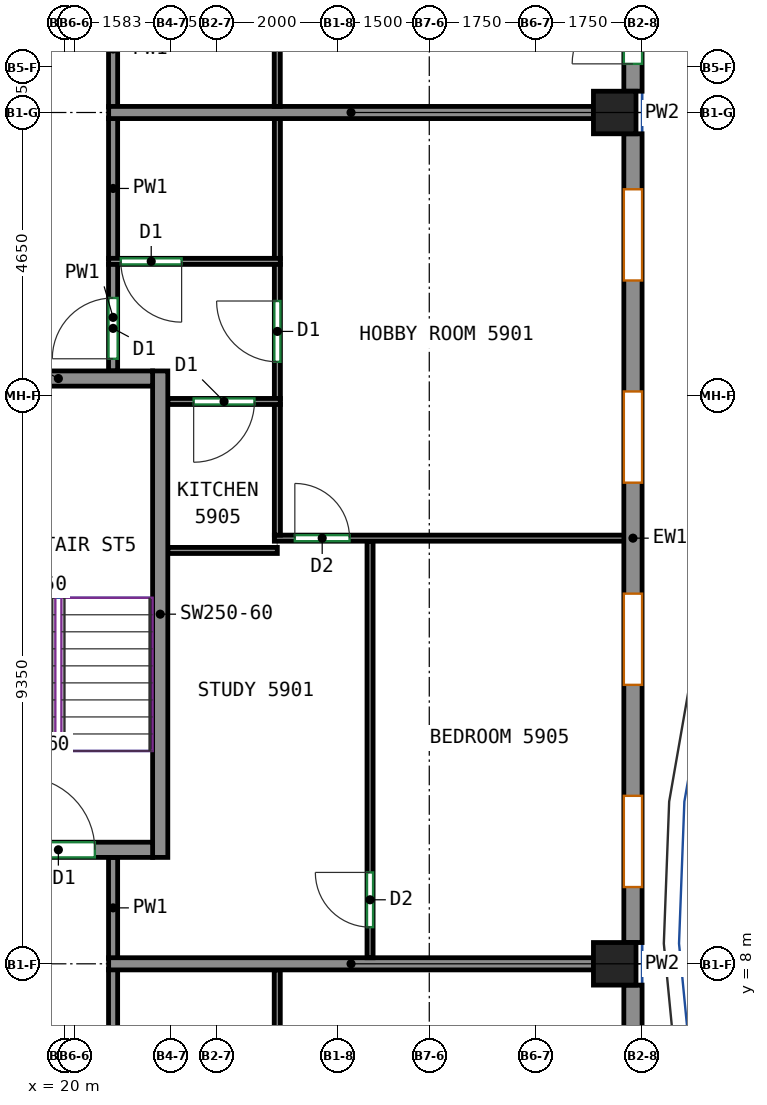
"""IFC4 building model, lengths in metres.
Left out: names, types, materials, properties, quantities, classifications, styles, units other than length and angle.
Written with IfcOpenShell. Run it as: python <this file> out.ifc"""

import sys

from ifc_helpers import new_model, si_unit, direction, frame, frame_2d, origin, origin_2d, place, context, subcontext, project, spatial, rectangle, extrude, source, transform, mapped, element, fill, save


model = new_model("IFC4")
c1 = context("Model", 3, precision=1e-05, world=origin(), true_north=direction((0.0, 1.0)))
c2 = subcontext(c1, "Body", "Model", "MODEL_VIEW")
j1 = project(units=[si_unit("LENGTHUNIT", "METRE"), si_unit("PLANEANGLEUNIT", "RADIAN")], contexts=[c1])
p1 = place(None, origin())
s1 = spatial("IfcSite", under=j1, at=p1, CompositionType="ELEMENT")
p2 = place(p1, origin())
s2 = spatial("IfcBuilding", under=s1, at=p2, CompositionType="ELEMENT")
p3 = place(p2, frame((0.0, 0.0, 245.8)))
s3 = spatial("IfcBuildingStorey", under=s2, at=p3, CompositionType="ELEMENT", Elevation=245.8)
m1 = source(origin(), c2, "Body", "SweptSolid", [
    extrude(rectangle(XDim=0.7, YDim=0.7, at=origin_2d()), origin(), (0.0, 0.0, 1.0), 3.12),
])
for number, where, z_axis, x_axis in (
    (1, (29.05, 8.0, 0.0), (0.0, 0.0, 1.0), (1.0, 0.0, 0.0)),
    (2, (29.05, 22.0, 0.0), (0.0, 0.0, 1.0), (1.0, 0.0, 0.0)),
):
    element("IfcColumn", number, at=place(p3, frame(where, z_axis=z_axis, x_axis=x_axis)), inside=s3, PredefinedType="COLUMN", context=c2, shape_type="MappedRepresentation", body=[
        mapped(m1, transform((0.0, 0.0, 0.0))),
    ])
m2 = source(origin(), c2, "Body", "SweptSolid", [
    extrude(rectangle(XDim=8.0, YDim=0.25, at=frame_2d((4.0, 0.0))), origin(), (0.0, 0.0, 1.0), 3.12),
])
p4 = place(p3, frame((21.575, 9.75, 0.0), z_axis=(0.0, 0.0, 1.0), x_axis=(0.0, 1.0, 0.0)))
e3 = element("IfcWall", 3, at=p4, inside=s3, PredefinedType="SHEAR", context=c2, shape_type="MappedRepresentation", body=[
    mapped(m2, transform((0.0, 0.0, 0.0))),
])
m3 = source(origin(), c2, "Body", "SweptSolid", [
    extrude(rectangle(XDim=3.1, YDim=0.25, at=frame_2d((1.55, 0.0))), origin(), (0.0, 0.0, 1.0), 3.12),
])
p5 = place(p3, frame((18.35, 9.875, 0.0), z_axis=(0.0, 0.0, 1.0), x_axis=(1.0, 0.0, 0.0)))
e4 = element("IfcWall", 4, at=p5, inside=s3, PredefinedType="SHEAR", context=c2, shape_type="MappedRepresentation", body=[
    mapped(m3, transform((0.0, 0.0, 0.0))),
])
p6 = place(p5, frame((0.95, 0.0, 0.0)))
e5 = element("IfcOpeningElement", 5, at=p6, cuts=e4, PredefinedType="OPENING", context=c2, shape_type="SweptSolid", body=[
    extrude(rectangle(XDim=1.2, YDim=2.1, at=frame_2d((0.6, 1.05))), frame((0.0, 0.135, 0.0), z_axis=(0.0, -1.0, 0.0), x_axis=(1.0, 0.0, 0.0)), (0.0, 0.0, 1.0), 0.27),
])
p7 = place(p3, frame((18.35, 17.625, 0.0), z_axis=(0.0, 0.0, 1.0), x_axis=(1.0, 0.0, 0.0)))
e6 = element("IfcWall", 6, at=p7, inside=s3, PredefinedType="SHEAR", context=c2, shape_type="MappedRepresentation", body=[
    mapped(m3, transform((0.0, 0.0, 0.0))),
])
m4 = source(origin(), c2, "Body", "SweptSolid", [
    extrude(rectangle(XDim=8.133, YDim=0.3, at=frame_2d((4.067, 0.0))), origin(), (0.0, 0.0, 1.0), 3.12),
])
p8 = place(p3, frame((29.35, -0.483, 0.0), z_axis=(0.0, 0.0, 1.0), x_axis=(0.0, 1.0, 0.0)))
e7 = element("IfcWall", 7, at=p8, inside=s3, PredefinedType="SOLIDWALL", context=c2, shape_type="MappedRepresentation", body=[
    mapped(m4, transform((0.0, 0.0, 0.0))),
])
p9 = place(p8, frame((1.75, 0.0, 0.8)))
e8 = element("IfcOpeningElement", 8, at=p9, cuts=e7, PredefinedType="OPENING", context=c2, shape_type="SweptSolid", body=[
    extrude(rectangle(XDim=1.5, YDim=2.05, at=frame_2d((0.75, 1.025))), frame((0.0, 0.16, 0.0), z_axis=(0.0, -1.0, 0.0), x_axis=(1.0, 0.0, 0.0)), (0.0, 0.0, 1.0), 0.32),
])
p10 = place(p8, frame((0.45, 0.0, 0.0)))
e9 = element("IfcOpeningElement", 9, at=p10, cuts=e7, PredefinedType="OPENING", context=c2, shape_type="SweptSolid", body=[
    extrude(rectangle(XDim=1.0, YDim=2.1, at=frame_2d((0.5, 1.05))), frame((0.0, 0.16, 0.0), z_axis=(0.0, -1.0, 0.0), x_axis=(1.0, 0.0, 0.0)), (0.0, 0.0, 1.0), 0.32),
])
p11 = place(p8, frame((5.817, 0.0, 0.8)))
e10 = element("IfcOpeningElement", 10, at=p11, cuts=e7, PredefinedType="OPENING", context=c2, shape_type="SweptSolid", body=[
    extrude(rectangle(XDim=1.5, YDim=2.05, at=frame_2d((0.75, 1.025))), frame((0.0, 0.16, 0.0), z_axis=(0.0, -1.0, 0.0), x_axis=(1.0, 0.0, 0.0)), (0.0, 0.0, 1.0), 0.32),
])
m5 = source(origin(), c2, "Body", "SweptSolid", [
    extrude(rectangle(XDim=13.3, YDim=0.3, at=frame_2d((6.65, 0.0))), origin(), (0.0, 0.0, 1.0), 3.12),
])
p12 = place(p3, frame((29.35, 8.35, 0.0), z_axis=(0.0, 0.0, 1.0), x_axis=(0.0, 1.0, 0.0)))
e11 = element("IfcWall", 11, at=p12, inside=s3, PredefinedType="SOLIDWALL", context=c2, shape_type="MappedRepresentation", body=[
    mapped(m5, transform((0.0, 0.0, 0.0))),
])
p13 = place(p12, frame((0.913, 0.0, 0.8)))
e12 = element("IfcOpeningElement", 12, at=p13, cuts=e11, PredefinedType="OPENING", context=c2, shape_type="SweptSolid", body=[
    extrude(rectangle(XDim=1.5, YDim=2.05, at=frame_2d((0.75, 1.025))), frame((0.0, 0.16, 0.0), z_axis=(0.0, -1.0, 0.0), x_axis=(1.0, 0.0, 0.0)), (0.0, 0.0, 1.0), 0.32),
])
p14 = place(p12, frame((4.238, 0.0, 0.8)))
e13 = element("IfcOpeningElement", 13, at=p14, cuts=e11, PredefinedType="OPENING", context=c2, shape_type="SweptSolid", body=[
    extrude(rectangle(XDim=1.5, YDim=2.05, at=frame_2d((0.75, 1.025))), frame((0.0, 0.16, 0.0), z_axis=(0.0, -1.0, 0.0), x_axis=(1.0, 0.0, 0.0)), (0.0, 0.0, 1.0), 0.32),
])
p15 = place(p12, frame((7.562, 0.0, 0.8)))
e14 = element("IfcOpeningElement", 14, at=p15, cuts=e11, PredefinedType="OPENING", context=c2, shape_type="SweptSolid", body=[
    extrude(rectangle(XDim=1.5, YDim=2.05, at=frame_2d((0.75, 1.025))), frame((0.0, 0.16, 0.0), z_axis=(0.0, -1.0, 0.0), x_axis=(1.0, 0.0, 0.0)), (0.0, 0.0, 1.0), 0.32),
])
p16 = place(p12, frame((10.887, 0.0, 0.8)))
e15 = element("IfcOpeningElement", 15, at=p16, cuts=e11, PredefinedType="OPENING", context=c2, shape_type="SweptSolid", body=[
    extrude(rectangle(XDim=1.5, YDim=2.05, at=frame_2d((0.75, 1.025))), frame((0.0, 0.16, 0.0), z_axis=(0.0, -1.0, 0.0), x_axis=(1.0, 0.0, 0.0)), (0.0, 0.0, 1.0), 0.32),
])
m6 = source(origin(), c2, "Body", "SweptSolid", [
    extrude(rectangle(XDim=4.3, YDim=0.3, at=frame_2d((2.15, 0.0))), origin(), (0.0, 0.0, 1.0), 3.12),
])
p17 = place(p3, frame((29.35, 22.35, 0.0), z_axis=(0.0, 0.0, 1.0), x_axis=(0.0, 1.0, 0.0)))
e16 = element("IfcWall", 16, at=p17, inside=s3, PredefinedType="SOLIDWALL", context=c2, shape_type="MappedRepresentation", body=[
    mapped(m6, transform((0.0, 0.0, 0.0))),
])
p18 = place(p17, frame((1.75, 0.0, 0.8)))
e17 = element("IfcOpeningElement", 17, at=p18, cuts=e16, PredefinedType="OPENING", context=c2, shape_type="SweptSolid", body=[
    extrude(rectangle(XDim=1.5, YDim=2.05, at=frame_2d((0.75, 1.025))), frame((0.0, 0.16, 0.0), z_axis=(0.0, -1.0, 0.0), x_axis=(1.0, 0.0, 0.0)), (0.0, 0.0, 1.0), 0.32),
])
p19 = place(p17, frame((0.45, 0.0, 0.0)))
e18 = element("IfcOpeningElement", 18, at=p19, cuts=e16, PredefinedType="OPENING", context=c2, shape_type="SweptSolid", body=[
    extrude(rectangle(XDim=1.0, YDim=2.1, at=frame_2d((0.5, 1.05))), frame((0.0, 0.16, 0.0), z_axis=(0.0, -1.0, 0.0), x_axis=(1.0, 0.0, 0.0)), (0.0, 0.0, 1.0), 0.32),
])
p20 = place(p3, frame((20.8, 3.623, 0.0), z_axis=(0.0, 0.0, 1.0), x_axis=(0.0, 1.0, 0.0)))
e19 = element("IfcWall", 19, at=p20, inside=s3, PredefinedType="PARTITIONING", context=c2, shape_type="SweptSolid", body=[
    extrude(rectangle(XDim=4.287, YDim=0.15, at=frame_2d((2.144, 0.0))), origin(), (0.0, 0.0, 1.0), 3.12),
])
p21 = place(p3, frame((20.8, 8.09, 0.0), z_axis=(0.0, 0.0, 1.0), x_axis=(0.0, 1.0, 0.0)))
e20 = element("IfcWall", 20, at=p21, inside=s3, PredefinedType="PARTITIONING", context=c2, shape_type="SweptSolid", body=[
    extrude(rectangle(XDim=1.66, YDim=0.15, at=frame_2d((0.83, 0.0))), origin(), (0.0, 0.0, 1.0), 3.12),
])
p22 = place(p3, frame((20.8, 17.75, 0.0), z_axis=(0.0, 0.0, 1.0), x_axis=(0.0, 1.0, 0.0)))
e21 = element("IfcWall", 21, at=p22, inside=s3, PredefinedType="PARTITIONING", context=c2, shape_type="SweptSolid", body=[
    extrude(rectangle(XDim=1.762, YDim=0.15, at=frame_2d((0.881, 0.0))), origin(), (0.0, 0.0, 1.0), 3.12),
])
p23 = place(p22, frame((0.2, 0.0, 0.0)))
e22 = element("IfcOpeningElement", 22, at=p23, cuts=e21, PredefinedType="OPENING", context=c2, shape_type="SweptSolid", body=[
    extrude(rectangle(XDim=1.0, YDim=2.1, at=frame_2d((0.5, 1.05))), frame((0.0, 0.085, 0.0), z_axis=(0.0, -1.0, 0.0), x_axis=(1.0, 0.0, 0.0)), (0.0, 0.0, 1.0), 0.17),
])
p24 = place(p3, frame((20.8, 19.592, 0.0), z_axis=(0.0, 0.0, 1.0), x_axis=(0.0, 1.0, 0.0)))
e23 = element("IfcWall", 23, at=p24, inside=s3, PredefinedType="PARTITIONING", context=c2, shape_type="SweptSolid", body=[
    extrude(rectangle(XDim=2.318, YDim=0.15, at=frame_2d((1.159, 0.0))), origin(), (0.0, 0.0, 1.0), 3.12),
])
p25 = place(p3, frame((20.8, 22.09, 0.0), z_axis=(0.0, 0.0, 1.0), x_axis=(0.0, 1.0, 0.0)))
e24 = element("IfcWall", 24, at=p25, inside=s3, PredefinedType="PARTITIONING", context=c2, shape_type="SweptSolid", body=[
    extrude(rectangle(XDim=1.908, YDim=0.15, at=frame_2d((0.954, 0.0))), origin(), (0.0, 0.0, 1.0), 3.12),
])
p26 = place(p3, frame((23.5, 3.633, 0.0), z_axis=(0.0, 0.0, 1.0), x_axis=(0.0, 1.0, 0.0)))
e25 = element("IfcWall", 25, at=p26, inside=s3, PredefinedType="PARTITIONING", context=c2, shape_type="SweptSolid", body=[
    extrude(rectangle(XDim=4.267, YDim=0.1, at=frame_2d((2.133, 0.0))), origin(), (0.0, 0.0, 1.0), 3.12),
])
p27 = place(p3, frame((20.727, 8.0, 0.0), z_axis=(0.0, 0.0, 1.0), x_axis=(1.0, 0.0, 0.0)))
e26 = element("IfcWall", 26, at=p27, inside=s3, PredefinedType="PARTITIONING", context=c2, shape_type="SweptSolid", body=[
    extrude(rectangle(XDim=7.973, YDim=0.2, at=frame_2d((3.986, 0.0))), origin(), (0.0, 0.0, 1.0), 2.57),
])
p28 = place(p3, frame((25.026, 8.1, 0.0), z_axis=(0.0, 0.0, 1.0), x_axis=(0.0, 1.0, 0.0)))
e27 = element("IfcWall", 27, at=p28, inside=s3, PredefinedType="PARTITIONING", context=c2, shape_type="SweptSolid", body=[
    extrude(rectangle(XDim=6.85, YDim=0.1, at=frame_2d((3.425, 0.0))), origin(), (0.0, 0.0, 1.0), 3.12),
])
p29 = place(p28, frame((0.503, 0.0, 0.0)))
e28 = element("IfcOpeningElement", 28, at=p29, cuts=e27, PredefinedType="OPENING", context=c2, shape_type="SweptSolid", body=[
    extrude(rectangle(XDim=0.9, YDim=2.1, at=frame_2d((0.45, 1.05))), frame((0.0, 0.06, 0.0), z_axis=(0.0, -1.0, 0.0), x_axis=(1.0, 0.0, 0.0)), (0.0, 0.0, 1.0), 0.12),
])
p30 = place(p3, frame((23.452, 15.0, 0.0), z_axis=(0.0, 0.0, 1.0), x_axis=(1.0, 0.0, 0.0)))
e29 = element("IfcWall", 29, at=p30, inside=s3, PredefinedType="PARTITIONING", context=c2, shape_type="SweptSolid", body=[
    extrude(rectangle(XDim=5.798, YDim=0.1, at=frame_2d((2.899, 0.0))), origin(), (0.0, 0.0, 1.0), 3.12),
])
p31 = place(p30, frame((0.337, 0.0, 0.0)))
e30 = element("IfcOpeningElement", 30, at=p31, cuts=e29, PredefinedType="OPENING", context=c2, shape_type="SweptSolid", body=[
    extrude(rectangle(XDim=0.9, YDim=2.1, at=frame_2d((0.45, 1.05))), frame((0.0, 0.06, 0.0), z_axis=(0.0, -1.0, 0.0), x_axis=(1.0, 0.0, 0.0)), (0.0, 0.0, 1.0), 0.12),
])
p32 = place(p3, frame((23.501, 14.798, 0.0), z_axis=(0.0, 0.0, 1.0), x_axis=(-1.0, 0.0, 0.0)))
e31 = element("IfcWall", 31, at=p32, inside=s3, PredefinedType="PARTITIONING", context=c2, shape_type="SweptSolid", body=[
    extrude(rectangle(XDim=1.801, YDim=0.1, at=frame_2d((0.9, 0.0))), origin(), (0.0, 0.0, 1.0), 3.12),
])
p33 = place(p3, frame((23.502, 15.05, 0.0), z_axis=(0.0, 0.0, 1.0), x_axis=(0.0, 1.0, 0.0)))
e32 = element("IfcWall", 32, at=p33, inside=s3, PredefinedType="PARTITIONING", context=c2, shape_type="SweptSolid", body=[
    extrude(rectangle(XDim=2.158, YDim=0.1, at=frame_2d((1.079, 0.0))), origin(), (0.0, 0.0, 1.0), 3.12),
])
p34 = place(p3, frame((23.502, 17.288, 0.0), z_axis=(0.0, 0.0, 1.0), x_axis=(0.0, 1.0, 0.0)))
e33 = element("IfcWall", 33, at=p34, inside=s3, PredefinedType="PARTITIONING", context=c2, shape_type="SweptSolid", body=[
    extrude(rectangle(XDim=2.224, YDim=0.1, at=frame_2d((1.112, 0.0))), origin(), (0.0, 0.0, 1.0), 3.12),
])
p35 = place(p34, frame((0.612, 0.0, 0.0)))
e34 = element("IfcOpeningElement", 34, at=p35, cuts=e33, PredefinedType="OPENING", context=c2, shape_type="SweptSolid", body=[
    extrude(rectangle(XDim=1.0, YDim=2.1, at=frame_2d((0.5, 1.05))), frame((0.0, 0.06, 0.0), z_axis=(0.0, -1.0, 0.0), x_axis=(1.0, 0.0, 0.0)), (0.0, 0.0, 1.0), 0.12),
])
p36 = place(p3, frame((23.502, 19.592, 0.0), z_axis=(0.0, 0.0, 1.0), x_axis=(0.0, 1.0, 0.0)))
e35 = element("IfcWall", 35, at=p36, inside=s3, PredefinedType="PARTITIONING", context=c2, shape_type="SweptSolid", body=[
    extrude(rectangle(XDim=2.308, YDim=0.1, at=frame_2d((1.154, 0.0))), origin(), (0.0, 0.0, 1.0), 3.12),
])
p37 = place(p3, frame((23.55, 17.248, 0.0), z_axis=(0.0, 0.0, 1.0), x_axis=(-1.0, 0.0, 0.0)))
e36 = element("IfcWall", 36, at=p37, inside=s3, PredefinedType="PARTITIONING", context=c2, shape_type="SweptSolid", body=[
    extrude(rectangle(XDim=1.85, YDim=0.1, at=frame_2d((0.925, 0.0))), origin(), (0.0, 0.0, 1.0), 3.12),
])
p38 = place(p37, frame((0.425, 0.0, 0.0)))
e37 = element("IfcOpeningElement", 37, at=p38, cuts=e36, PredefinedType="OPENING", context=c2, shape_type="SweptSolid", body=[
    extrude(rectangle(XDim=1.0, YDim=2.1, at=frame_2d((0.5, 1.05))), frame((0.0, 0.06, 0.0), z_axis=(0.0, -1.0, 0.0), x_axis=(1.0, 0.0, 0.0)), (0.0, 0.0, 1.0), 0.12),
])
p39 = place(p3, frame((23.55, 19.552, 0.0), z_axis=(0.0, 0.0, 1.0), x_axis=(-1.0, 0.0, 0.0)))
e38 = element("IfcWall", 38, at=p39, inside=s3, PredefinedType="PARTITIONING", context=c2, shape_type="SweptSolid", body=[
    extrude(rectangle(XDim=2.823, YDim=0.1, at=frame_2d((1.412, 0.0))), origin(), (0.0, 0.0, 1.0), 3.12),
])
p40 = place(p39, frame((1.623, 0.0, 0.0)))
e39 = element("IfcOpeningElement", 39, at=p40, cuts=e38, PredefinedType="OPENING", context=c2, shape_type="SweptSolid", body=[
    extrude(rectangle(XDim=1.0, YDim=2.1, at=frame_2d((0.5, 1.05))), frame((0.0, 0.06, 0.0), z_axis=(0.0, -1.0, 0.0), x_axis=(1.0, 0.0, 0.0)), (0.0, 0.0, 1.0), 0.12),
])
p41 = place(p3, frame((20.727, 22.0, 0.0), z_axis=(0.0, 0.0, 1.0), x_axis=(1.0, 0.0, 0.0)))
e40 = element("IfcWall", 40, at=p41, inside=s3, PredefinedType="PARTITIONING", context=c2, shape_type="SweptSolid", body=[
    extrude(rectangle(XDim=7.973, YDim=0.2, at=frame_2d((3.986, 0.0))), origin(), (0.0, 0.0, 1.0), 2.57),
])
p42 = place(p3, frame((23.5, 22.1, 0.0), z_axis=(0.0, 0.0, 1.0), x_axis=(0.0, 1.0, 0.0)))
e41 = element("IfcWall", 41, at=p42, inside=s3, PredefinedType="PARTITIONING", context=c2, shape_type="SweptSolid", body=[
    extrude(rectangle(XDim=3.985, YDim=0.1, at=frame_2d((1.992, 0.0))), origin(), (0.0, 0.0, 1.0), 3.12),
])
p43 = place(p42, frame((2.678, 0.0, 0.0)))
e42 = element("IfcOpeningElement", 42, at=p43, cuts=e41, PredefinedType="OPENING", context=c2, shape_type="SweptSolid", body=[
    extrude(rectangle(XDim=0.9, YDim=2.1, at=frame_2d((0.45, 1.05))), frame((0.0, 0.06, 0.0), z_axis=(0.0, -1.0, 0.0), x_axis=(1.0, 0.0, 0.0)), (0.0, 0.0, 1.0), 0.12),
])
p44 = place(p13, origin())
e43 = element("IfcWindow", 43, at=p44, inside=s3, PartitioningType="SINGLE_PANEL", PredefinedType="WINDOW", context=c2, shape_type="SweptSolid", body=[
    extrude(rectangle(XDim=1.5, YDim=2.05, at=frame_2d((0.75, 1.025))), frame((0.0, 0.03, 0.0), z_axis=(0.0, -1.0, 0.0), x_axis=(1.0, 0.0, 0.0)), (0.0, 0.0, 1.0), 0.06),
])
fill(e12, e43)
p45 = place(p14, origin())
e44 = element("IfcWindow", 44, at=p45, inside=s3, PartitioningType="SINGLE_PANEL", PredefinedType="WINDOW", context=c2, shape_type="SweptSolid", body=[
    extrude(rectangle(XDim=1.5, YDim=2.05, at=frame_2d((0.75, 1.025))), frame((0.0, 0.03, 0.0), z_axis=(0.0, -1.0, 0.0), x_axis=(1.0, 0.0, 0.0)), (0.0, 0.0, 1.0), 0.06),
])
fill(e13, e44)
p46 = place(p15, origin())
e45 = element("IfcWindow", 45, at=p46, inside=s3, PartitioningType="SINGLE_PANEL", PredefinedType="WINDOW", context=c2, shape_type="SweptSolid", body=[
    extrude(rectangle(XDim=1.5, YDim=2.05, at=frame_2d((0.75, 1.025))), frame((0.0, 0.03, 0.0), z_axis=(0.0, -1.0, 0.0), x_axis=(1.0, 0.0, 0.0)), (0.0, 0.0, 1.0), 0.06),
])
fill(e14, e45)
p47 = place(p16, origin())
e46 = element("IfcWindow", 46, at=p47, inside=s3, PartitioningType="SINGLE_PANEL", PredefinedType="WINDOW", context=c2, shape_type="SweptSolid", body=[
    extrude(rectangle(XDim=1.5, YDim=2.05, at=frame_2d((0.75, 1.025))), frame((0.0, 0.03, 0.0), z_axis=(0.0, -1.0, 0.0), x_axis=(1.0, 0.0, 0.0)), (0.0, 0.0, 1.0), 0.06),
])
fill(e15, e46)
p48 = place(p19, origin())
e47 = element("IfcDoor", 47, at=p48, inside=s3, OperationType="SINGLE_SWING_LEFT", PredefinedType="DOOR", context=c2, shape_type="SweptSolid", body=[
    extrude(rectangle(XDim=1.0, YDim=2.1, at=frame_2d((0.5, 1.05))), frame((0.0, 0.025, 0.0), z_axis=(0.0, -1.0, 0.0), x_axis=(1.0, 0.0, 0.0)), (0.0, 0.0, 1.0), 0.05),
])
fill(e18, e47)
p49 = place(p6, origin())
e48 = element("IfcDoor", 48, at=p49, inside=s3, OperationType="DOUBLE_DOOR_SINGLE_SWING", PredefinedType="DOOR", context=c2, shape_type="SweptSolid", body=[
    extrude(rectangle(XDim=1.2, YDim=2.1, at=frame_2d((0.6, 1.05))), frame((0.0, 0.025, 0.0), z_axis=(0.0, -1.0, 0.0), x_axis=(1.0, 0.0, 0.0)), (0.0, 0.0, 1.0), 0.05),
])
fill(e5, e48)
p50 = place(p29, origin())
e49 = element("IfcDoor", 49, at=p50, inside=s3, OperationType="SINGLE_SWING_RIGHT", PredefinedType="DOOR", context=c2, shape_type="SweptSolid", body=[
    extrude(rectangle(XDim=0.9, YDim=2.1, at=frame_2d((0.45, 1.05))), frame((0.0, 0.025, 0.0), z_axis=(0.0, -1.0, 0.0), x_axis=(1.0, 0.0, 0.0)), (0.0, 0.0, 1.0), 0.05),
])
fill(e28, e49)
p51 = place(p31, origin())
e50 = element("IfcDoor", 50, at=p51, inside=s3, OperationType="SINGLE_SWING_LEFT", PredefinedType="DOOR", context=c2, shape_type="SweptSolid", body=[
    extrude(rectangle(XDim=0.9, YDim=2.1, at=frame_2d((0.45, 1.05))), frame((0.0, 0.025, 0.0), z_axis=(0.0, -1.0, 0.0), x_axis=(1.0, 0.0, 0.0)), (0.0, 0.0, 1.0), 0.05),
])
fill(e30, e50)
p52 = place(p38, origin())
e51 = element("IfcDoor", 51, at=p52, inside=s3, OperationType="SINGLE_SWING_RIGHT", PredefinedType="DOOR", context=c2, shape_type="SweptSolid", body=[
    extrude(rectangle(XDim=1.0, YDim=2.1, at=frame_2d((0.5, 1.05))), frame((0.0, 0.025, 0.0), z_axis=(0.0, -1.0, 0.0), x_axis=(1.0, 0.0, 0.0)), (0.0, 0.0, 1.0), 0.05),
])
fill(e37, e51)
p53 = place(p35, origin())
e52 = element("IfcDoor", 52, at=p53, inside=s3, OperationType="SINGLE_SWING_RIGHT", PredefinedType="DOOR", context=c2, shape_type="SweptSolid", body=[
    extrude(rectangle(XDim=1.0, YDim=2.1, at=frame_2d((0.5, 1.05))), frame((0.0, 0.025, 0.0), z_axis=(0.0, -1.0, 0.0), x_axis=(1.0, 0.0, 0.0)), (0.0, 0.0, 1.0), 0.05),
])
fill(e34, e52)
p54 = place(p23, origin())
e53 = element("IfcDoor", 53, at=p54, inside=s3, OperationType="SINGLE_SWING_LEFT", PredefinedType="DOOR", context=c2, shape_type="SweptSolid", body=[
    extrude(rectangle(XDim=1.0, YDim=2.1, at=frame_2d((0.5, 1.05))), frame((0.0, 0.025, 0.0), z_axis=(0.0, -1.0, 0.0), x_axis=(1.0, 0.0, 0.0)), (0.0, 0.0, 1.0), 0.05),
])
fill(e22, e53)
p55 = place(p40, origin())
e54 = element("IfcDoor", 54, at=p55, inside=s3, OperationType="SINGLE_SWING_LEFT", PredefinedType="DOOR", context=c2, shape_type="SweptSolid", body=[
    extrude(rectangle(XDim=1.0, YDim=2.1, at=frame_2d((0.5, 1.05))), frame((0.0, 0.025, 0.0), z_axis=(0.0, -1.0, 0.0), x_axis=(1.0, 0.0, 0.0)), (0.0, 0.0, 1.0), 0.05),
])
fill(e39, e54)
save(model, sys.argv[1])
